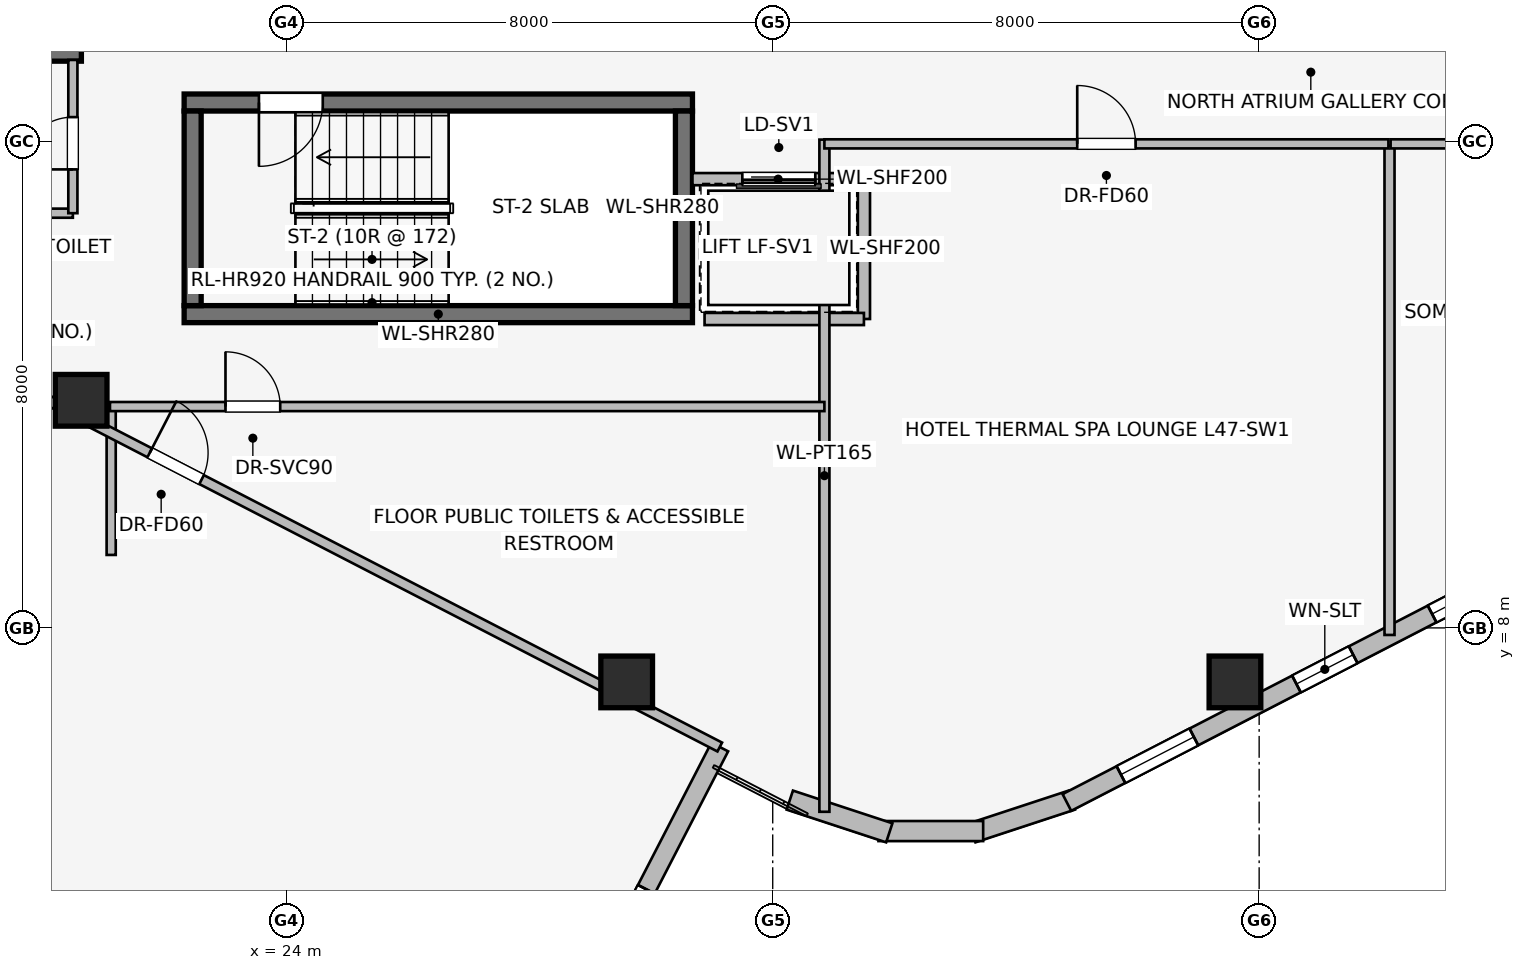
"""IFC4 building model, lengths in metres.
Left out: names, types, materials, properties, quantities, classifications, styles, units other than length and angle.
Written with IfcOpenShell. Run it as: python <this file> out.ifc"""

import sys

from ifc_helpers import new_model, si_unit, direction, frame, frame_2d, origin, origin_2d, place, context, subcontext, project, spatial, rectangle, extrude, element, fill, save


model = new_model("IFC4")
c1 = context("Model", 3, precision=1e-05, world=origin(), true_north=direction((0.0, 1.0)))
c2 = subcontext(c1, "Body", "Model", "MODEL_VIEW")
j1 = project(units=[si_unit("LENGTHUNIT", "METRE"), si_unit("PLANEANGLEUNIT", "RADIAN")], contexts=[c1])
p1 = place(None, origin())
s1 = spatial("IfcSite", under=j1, at=p1, CompositionType="ELEMENT")
p2 = place(p1, origin())
s2 = spatial("IfcBuilding", under=s1, at=p2, CompositionType="ELEMENT")
p3 = place(p2, frame((0.0, 0.0, 174.0)))
s3 = spatial("IfcBuildingStorey", under=s2, at=p3, CompositionType="ELEMENT", Elevation=174.0)
p4 = place(p3, frame((16.87, 17.46, 0.0), z_axis=(0.0, 0.0, 1.0), x_axis=(1.0, 0.0, 0.0)))
e1 = element("IfcWall", 1, at=p4, inside=s3, PredefinedType="SHEAR", context=c2, shape_type="SweptSolid", body=[
    extrude(rectangle(XDim=3.76, YDim=0.28, at=frame_2d((1.88, 0.0))), origin(), (0.0, 0.0, 1.0), 3.45),
])
p5 = place(p3, frame((22.32, 13.16, 0.0), z_axis=(0.0, 0.0, 1.0), x_axis=(1.0, 0.0, 0.0)))
e2 = element("IfcWall", 2, at=p5, inside=s3, PredefinedType="SHEAR", context=c2, shape_type="SweptSolid", body=[
    extrude(rectangle(XDim=8.36, YDim=0.28, at=frame_2d((4.18, 0.0))), origin(), (0.0, 0.0, 1.0), 3.45),
])
p6 = place(p3, frame((30.68, 16.64, 0.0), z_axis=(0.0, 0.0, 1.0), x_axis=(-1.0, 0.0, 0.0)))
e3 = element("IfcWall", 3, at=p6, inside=s3, PredefinedType="SHEAR", context=c2, shape_type="SweptSolid", body=[
    extrude(rectangle(XDim=8.36, YDim=0.28, at=frame_2d((4.18, 0.0))), origin(), (0.0, 0.0, 1.0), 3.45),
])
p7 = place(p6, frame((6.08, 0.0, 0.0)))
e4 = element("IfcOpeningElement", 4, at=p7, cuts=e3, PredefinedType="OPENING", context=c2, shape_type="SweptSolid", body=[
    extrude(rectangle(XDim=1.05, YDim=2.0, at=frame_2d((0.525, 1.0))), frame((0.0, 0.15, 0.0), z_axis=(0.0, -1.0, 0.0), x_axis=(1.0, 0.0, 0.0)), (0.0, 0.0, 1.0), 0.3),
])
for number, where, z_axis, x_axis in (
    (5, (22.46, 16.5, 0.0), (0.0, 0.0, 1.0), (0.0, -1.0, 0.0)),
    (6, (30.54, 13.3, 0.0), (0.0, 0.0, 1.0), (0.0, 1.0, 0.0)),
):
    element("IfcWall", number, at=place(p3, frame(where, z_axis=z_axis, x_axis=x_axis)), inside=s3, PredefinedType="SHEAR", context=c2, shape_type="SweptSolid", body=[
        extrude(rectangle(XDim=3.2, YDim=0.28, at=frame_2d((1.6, 0.0))), origin(), (0.0, 0.0, 1.0), 3.45),
    ])
for number, where, z_axis, x_axis in (
    (7, (20.626, 11.743, 0.0), (0.0, 0.0, 1.0), (1.0, 0.0, 0.0)),
    (8, (29.598, 7.112, 0.0), (0.0, 0.0, 1.0), (1.0, 0.0, 0.0)),
    (9, (39.602, 7.112, 0.0), (0.0, 0.0, 1.0), (1.0, 0.0, 0.0)),
):
    element("IfcColumn", number, at=place(p3, frame(where, z_axis=z_axis, x_axis=x_axis)), inside=s3, PredefinedType="COLUMN", context=c2, shape_type="SweptSolid", body=[
        extrude(rectangle(XDim=0.85, YDim=0.85, at=origin_2d()), origin(), (0.0, 0.0, 1.0), 3.45),
    ])
p8 = place(p3, frame((31.129, 6.041, 0.0), z_axis=(0.0, 0.0, 1.0), x_axis=(-0.458626737826, -0.88862900884, 0.0)))
e10 = element("IfcWall", 10, at=p8, inside=s3, PredefinedType="STANDARD", context=c2, shape_type="SweptSolid", body=[
    extrude(rectangle(XDim=19.6, YDim=0.31, at=frame_2d((9.8, 0.0))), origin(), (0.0, 0.0, 1.0), 3.16),
])
p9 = place(p8, frame((2.633, 0.0, 0.75)))
e11 = element("IfcOpeningElement", 11, at=p9, cuts=e10, PredefinedType="OPENING", context=c2, shape_type="SweptSolid", body=[
    extrude(rectangle(XDim=2.0, YDim=1.5, at=frame_2d((1.0, 0.75))), frame((0.0, 0.165, 0.0), z_axis=(0.0, -1.0, 0.0), x_axis=(1.0, 0.0, 0.0)), (0.0, 0.0, 1.0), 0.33),
])
p10 = place(p8, frame((8.8, 0.0, 0.75)))
e12 = element("IfcOpeningElement", 12, at=p10, cuts=e10, PredefinedType="OPENING", context=c2, shape_type="SweptSolid", body=[
    extrude(rectangle(XDim=2.0, YDim=1.5, at=frame_2d((1.0, 0.75))), frame((0.0, 0.165, 0.0), z_axis=(0.0, -1.0, 0.0), x_axis=(1.0, 0.0, 0.0)), (0.0, 0.0, 1.0), 0.33),
])
p11 = place(p8, frame((14.967, 0.0, 0.75)))
e13 = element("IfcOpeningElement", 13, at=p11, cuts=e10, PredefinedType="OPENING", context=c2, shape_type="SweptSolid", body=[
    extrude(rectangle(XDim=2.0, YDim=1.5, at=frame_2d((1.0, 0.75))), frame((0.0, 0.165, 0.0), z_axis=(0.0, -1.0, 0.0), x_axis=(1.0, 0.0, 0.0)), (0.0, 0.0, 1.0), 0.33),
])
p12 = place(p3, frame((36.919, 5.168, 0.0), z_axis=(0.0, 0.0, 1.0), x_axis=(-0.949937416267, -0.312440242569, 0.0)))
e14 = element("IfcWall", 14, at=p12, inside=s3, PredefinedType="STANDARD", context=c2, shape_type="SweptSolid", body=[
    extrude(rectangle(XDim=1.722, YDim=0.33, at=frame_2d((0.861, 0.0))), origin(), (0.0, 0.0, 1.0), 3.16),
])
p13 = place(p3, frame((35.461, 4.659, 0.0), z_axis=(0.0, 0.0, 1.0), x_axis=(-1.0, 0.0, 0.0)))
e15 = element("IfcWall", 15, at=p13, inside=s3, PredefinedType="STANDARD", context=c2, shape_type="SweptSolid", body=[
    extrude(rectangle(XDim=1.722, YDim=0.33, at=frame_2d((0.861, 0.0))), origin(), (0.0, 0.0, 1.0), 3.16),
])
p14 = place(p3, frame((33.917, 4.63, 0.0), z_axis=(0.0, 0.0, 1.0), x_axis=(-0.949937416267, 0.312440242569, 0.0)))
e16 = element("IfcWall", 16, at=p14, inside=s3, PredefinedType="STANDARD", context=c2, shape_type="SweptSolid", body=[
    extrude(rectangle(XDim=1.722, YDim=0.33, at=frame_2d((0.861, 0.0))), origin(), (0.0, 0.0, 1.0), 3.16),
])
p15 = place(p3, frame((51.792, 12.847, 0.0), z_axis=(0.0, 0.0, 1.0), x_axis=(-0.888626188278, -0.458632202867, 0.0)))
e17 = element("IfcWall", 17, at=p15, inside=s3, PredefinedType="STANDARD", context=c2, shape_type="SweptSolid", body=[
    extrude(rectangle(XDim=16.828, YDim=0.31, at=frame_2d((8.414, 0.0))), origin(), (0.0, 0.0, 1.0), 3.16),
])
p16 = place(p15, frame((0.675, 0.0, 0.75)))
e18 = element("IfcOpeningElement", 18, at=p16, cuts=e17, PredefinedType="OPENING", context=c2, shape_type="SweptSolid", body=[
    extrude(rectangle(XDim=2.0, YDim=1.5, at=frame_2d((1.0, 0.75))), frame((0.0, 0.165, 0.0), z_axis=(0.0, -1.0, 0.0), x_axis=(1.0, 0.0, 0.0)), (0.0, 0.0, 1.0), 0.33),
])
p17 = place(p15, frame((4.349, 0.0, 0.75)))
e19 = element("IfcOpeningElement", 19, at=p17, cuts=e17, PredefinedType="OPENING", context=c2, shape_type="SweptSolid", body=[
    extrude(rectangle(XDim=1.35, YDim=1.45, at=frame_2d((0.675, 0.725))), frame((0.0, 0.165, 0.0), z_axis=(0.0, -1.0, 0.0), x_axis=(1.0, 0.0, 0.0)), (0.0, 0.0, 1.0), 0.33),
])
p18 = place(p15, frame((6.534, 0.0, 0.75)))
e20 = element("IfcOpeningElement", 20, at=p18, cuts=e17, PredefinedType="OPENING", context=c2, shape_type="SweptSolid", body=[
    extrude(rectangle(XDim=1.35, YDim=1.45, at=frame_2d((0.675, 0.725))), frame((0.0, 0.165, 0.0), z_axis=(0.0, -1.0, 0.0), x_axis=(1.0, 0.0, 0.0)), (0.0, 0.0, 1.0), 0.33),
])
p19 = place(p15, frame((8.719, 0.0, 0.75)))
e21 = element("IfcOpeningElement", 21, at=p19, cuts=e17, PredefinedType="OPENING", context=c2, shape_type="SweptSolid", body=[
    extrude(rectangle(XDim=1.35, YDim=1.45, at=frame_2d((0.675, 0.725))), frame((0.0, 0.165, 0.0), z_axis=(0.0, -1.0, 0.0), x_axis=(1.0, 0.0, 0.0)), (0.0, 0.0, 1.0), 0.33),
])
p20 = place(p15, frame((11.53, 0.0, 0.75)))
e22 = element("IfcOpeningElement", 22, at=p20, cuts=e17, PredefinedType="OPENING", context=c2, shape_type="SweptSolid", body=[
    extrude(rectangle(XDim=1.05, YDim=1.4, at=frame_2d((0.525, 0.7))), frame((0.0, 0.165, 0.0), z_axis=(0.0, -1.0, 0.0), x_axis=(1.0, 0.0, 0.0)), (0.0, 0.0, 1.0), 0.33),
])
p21 = place(p15, frame((14.478, 0.0, 0.75)))
e23 = element("IfcOpeningElement", 23, at=p21, cuts=e17, PredefinedType="OPENING", context=c2, shape_type="SweptSolid", body=[
    extrude(rectangle(XDim=1.35, YDim=1.45, at=frame_2d((0.675, 0.725))), frame((0.0, 0.165, 0.0), z_axis=(0.0, -1.0, 0.0), x_axis=(1.0, 0.0, 0.0)), (0.0, 0.0, 1.0), 0.33),
])
p22 = place(p3, frame((33.5, 15.38, 0.0), z_axis=(0.0, 0.0, 1.0), x_axis=(-1.0, 0.0, 0.0)))
e24 = element("IfcWall", 24, at=p22, inside=s3, PredefinedType="PARTITIONING", context=c2, shape_type="SweptSolid", body=[
    extrude(rectangle(XDim=2.82, YDim=0.2, at=frame_2d((1.41, 0.0))), origin(), (0.0, 0.0, 1.0), 3.16),
])
p23 = place(p22, frame((0.8, 0.0, 0.0)))
e25 = element("IfcOpeningElement", 25, at=p23, cuts=e24, PredefinedType="OPENING", context=c2, shape_type="SweptSolid", body=[
    extrude(rectangle(XDim=1.2, YDim=2.2, at=frame_2d((0.6, 1.1))), frame((0.0, 0.11, 0.0), z_axis=(0.0, -1.0, 0.0), x_axis=(1.0, 0.0, 0.0)), (0.0, 0.0, 1.0), 0.22),
])
p24 = place(p3, frame((33.5, 13.08, 0.0), z_axis=(0.0, 0.0, 1.0), x_axis=(0.0, 1.0, 0.0)))
e26 = element("IfcWall", 26, at=p24, inside=s3, PredefinedType="PARTITIONING", context=c2, shape_type="SweptSolid", body=[
    extrude(rectangle(XDim=2.3, YDim=0.2, at=frame_2d((1.15, 0.0))), origin(), (0.0, 0.0, 1.0), 3.16),
])
p25 = place(p3, frame((30.879, 13.08, 0.0), z_axis=(0.0, 0.0, 1.0), x_axis=(1.0, 0.0, 0.0)))
e27 = element("IfcWall", 27, at=p25, inside=s3, PredefinedType="PARTITIONING", context=c2, shape_type="SweptSolid", body=[
    extrude(rectangle(XDim=2.621, YDim=0.2, at=frame_2d((1.311, 0.0))), origin(), (0.0, 0.0, 1.0), 3.16),
])
p26 = place(p3, frame((18.1, 14.82, 0.0), z_axis=(0.0, 0.0, 1.0), x_axis=(1.0, 0.0, 0.0)))
e28 = element("IfcWall", 28, at=p26, inside=s3, PredefinedType="PARTITIONING", context=c2, shape_type="SweptSolid", body=[
    extrude(rectangle(XDim=2.39, YDim=0.15, at=frame_2d((1.195, 0.0))), origin(), (0.0, 0.0, 1.0), 3.16),
])
p27 = place(p3, frame((20.49, 14.82, 0.0), z_axis=(0.0, 0.0, 1.0), x_axis=(0.0, 1.0, 0.0)))
e29 = element("IfcWall", 29, at=p27, inside=s3, PredefinedType="PARTITIONING", context=c2, shape_type="SweptSolid", body=[
    extrude(rectangle(XDim=2.52, YDim=0.15, at=frame_2d((1.26, 0.0))), origin(), (0.0, 0.0, 1.0), 3.16),
])
p28 = place(p27, frame((0.72, 0.0, 0.0)))
e30 = element("IfcOpeningElement", 30, at=p28, cuts=e29, PredefinedType="OPENING", context=c2, shape_type="SweptSolid", body=[
    extrude(rectangle(XDim=0.86, YDim=2.0, at=frame_2d((0.43, 1.0))), frame((0.0, 0.085, 0.0), z_axis=(0.0, -1.0, 0.0), x_axis=(1.0, 0.0, 0.0)), (0.0, 0.0, 1.0), 0.17),
])
p29 = place(p3, frame((21.12, 9.2, 0.0), z_axis=(0.0, 0.0, 1.0), x_axis=(0.0, 1.0, 0.0)))
e31 = element("IfcWall", 31, at=p29, inside=s3, PredefinedType="PARTITIONING", context=c2, shape_type="SweptSolid", body=[
    extrude(rectangle(XDim=2.48, YDim=0.15, at=frame_2d((1.24, 0.0))), origin(), (0.0, 0.0, 1.0), 3.16),
])
p30 = place(p3, frame((32.85, 4.976, 0.0), z_axis=(0.0, 0.0, 1.0), x_axis=(0.0, 1.0, 0.0)))
e32 = element("IfcWall", 32, at=p30, inside=s3, PredefinedType="PARTITIONING", context=c2, shape_type="SweptSolid", body=[
    extrude(rectangle(XDim=11.054, YDim=0.165, at=frame_2d((5.527, 0.0))), origin(), (0.0, 0.0, 1.0), 3.16),
])
p31 = place(p3, frame((21.1, 11.64, 0.0), z_axis=(0.0, 0.0, 1.0), x_axis=(1.0, 0.0, 0.0)))
e33 = element("IfcWall", 33, at=p31, inside=s3, PredefinedType="PARTITIONING", context=c2, shape_type="SweptSolid", body=[
    extrude(rectangle(XDim=11.75, YDim=0.15, at=frame_2d((5.875, 0.0))), origin(), (0.0, 0.0, 1.0), 3.16),
])
p32 = place(p31, frame((1.9, 0.0, 0.0)))
e34 = element("IfcOpeningElement", 34, at=p32, cuts=e33, PredefinedType="OPENING", context=c2, shape_type="SweptSolid", body=[
    extrude(rectangle(XDim=0.9, YDim=2.0, at=frame_2d((0.45, 1.0))), frame((0.0, 0.085, 0.0), z_axis=(0.0, -1.0, 0.0), x_axis=(1.0, 0.0, 0.0)), (0.0, 0.0, 1.0), 0.17),
])
p33 = place(p3, frame((42.144, 7.884, 0.0), z_axis=(0.0, 0.0, 1.0), x_axis=(0.0, 1.0, 0.0)))
e35 = element("IfcWall", 35, at=p33, inside=s3, PredefinedType="PARTITIONING", context=c2, shape_type="SweptSolid", body=[
    extrude(rectangle(XDim=8.046, YDim=0.165, at=frame_2d((4.023, 0.0))), origin(), (0.0, 0.0, 1.0), 3.16),
])
p34 = place(p3, frame((32.85, 15.96, 0.0), z_axis=(0.0, 0.0, 1.0), x_axis=(1.0, 0.0, 0.0)))
e36 = element("IfcWall", 36, at=p34, inside=s3, PredefinedType="PARTITIONING", context=c2, shape_type="SweptSolid", body=[
    extrude(rectangle(XDim=9.276, YDim=0.15, at=frame_2d((4.638, 0.0))), origin(), (0.0, 0.0, 1.0), 3.16),
])
p35 = place(p34, frame((4.158, 0.0, 0.0)))
e37 = element("IfcOpeningElement", 37, at=p35, cuts=e36, PredefinedType="OPENING", context=c2, shape_type="SweptSolid", body=[
    extrude(rectangle(XDim=0.96, YDim=2.0, at=frame_2d((0.48, 1.0))), frame((0.0, 0.085, 0.0), z_axis=(0.0, -1.0, 0.0), x_axis=(1.0, 0.0, 0.0)), (0.0, 0.0, 1.0), 0.17),
])
p36 = place(p3, frame((42.162, 15.96, 0.0), z_axis=(0.0, 0.0, 1.0), x_axis=(1.0, 0.0, 0.0)))
e38 = element("IfcWall", 38, at=p36, inside=s3, PredefinedType="PARTITIONING", context=c2, shape_type="SweptSolid", body=[
    extrude(rectangle(XDim=11.901, YDim=0.15, at=frame_2d((5.95, 0.0))), origin(), (0.0, 0.0, 1.0), 3.16),
])
p37 = place(p36, frame((5.539, 0.0, 0.0)))
e39 = element("IfcOpeningElement", 39, at=p37, cuts=e38, PredefinedType="OPENING", context=c2, shape_type="SweptSolid", body=[
    extrude(rectangle(XDim=0.96, YDim=2.0, at=frame_2d((0.48, 1.0))), frame((0.0, 0.085, 0.0), z_axis=(0.0, -1.0, 0.0), x_axis=(1.0, 0.0, 0.0)), (0.0, 0.0, 1.0), 0.17),
])
p38 = place(p3, frame((18.866, 12.37, 0.0), z_axis=(0.0, 0.0, 1.0), x_axis=(0.888625308836, -0.458633906832, 0.0)))
e40 = element("IfcWall", 40, at=p38, inside=s3, PredefinedType="PARTITIONING", context=c2, shape_type="SweptSolid", body=[
    extrude(rectangle(XDim=13.8, YDim=0.165, at=frame_2d((6.9, 0.0))), origin(), (0.0, 0.0, 1.0), 2.611),
])
p39 = place(p38, frame((3.25, 0.0, 0.0)))
e41 = element("IfcOpeningElement", 41, at=p39, cuts=e40, PredefinedType="OPENING", context=c2, shape_type="SweptSolid", body=[
    extrude(rectangle(XDim=0.96, YDim=2.0, at=frame_2d((0.48, 1.0))), frame((0.0, 0.093, 0.0), z_axis=(0.0, -1.0, 0.0), x_axis=(1.0, 0.0, 0.0)), (0.0, 0.0, 1.0), 0.185),
])
p40 = place(p9, origin())
e42 = element("IfcWindow", 42, at=p40, inside=s3, PartitioningType="SINGLE_PANEL", PredefinedType="WINDOW", context=c2, shape_type="SweptSolid", body=[
    extrude(rectangle(XDim=2.0, YDim=1.5, at=frame_2d((1.0, 0.75))), frame((0.0, 0.03, 0.0), z_axis=(0.0, -1.0, 0.0), x_axis=(1.0, 0.0, 0.0)), (0.0, 0.0, 1.0), 0.06),
])
fill(e11, e42)
p41 = place(p19, origin())
e43 = element("IfcWindow", 43, at=p41, inside=s3, PartitioningType="SINGLE_PANEL", PredefinedType="WINDOW", context=c2, shape_type="SweptSolid", body=[
    extrude(rectangle(XDim=1.35, YDim=1.45, at=frame_2d((0.675, 0.725))), frame((0.0, 0.03, 0.0), z_axis=(0.0, -1.0, 0.0), x_axis=(1.0, 0.0, 0.0)), (0.0, 0.0, 1.0), 0.06),
])
fill(e21, e43)
p42 = place(p20, origin())
e44 = element("IfcWindow", 44, at=p42, inside=s3, PartitioningType="SINGLE_PANEL", PredefinedType="WINDOW", context=c2, shape_type="SweptSolid", body=[
    extrude(rectangle(XDim=1.05, YDim=1.4, at=frame_2d((0.525, 0.7))), frame((0.0, 0.03, 0.0), z_axis=(0.0, -1.0, 0.0), x_axis=(1.0, 0.0, 0.0)), (0.0, 0.0, 1.0), 0.06),
])
fill(e22, e44)
p43 = place(p21, origin())
e45 = element("IfcWindow", 45, at=p43, inside=s3, PartitioningType="SINGLE_PANEL", PredefinedType="WINDOW", context=c2, shape_type="SweptSolid", body=[
    extrude(rectangle(XDim=1.35, YDim=1.45, at=frame_2d((0.675, 0.725))), frame((0.0, 0.03, 0.0), z_axis=(0.0, -1.0, 0.0), x_axis=(1.0, 0.0, 0.0)), (0.0, 0.0, 1.0), 0.06),
])
fill(e23, e45)
p44 = place(p7, origin())
e46 = element("IfcDoor", 46, at=p44, inside=s3, OperationType="SINGLE_SWING_RIGHT", PredefinedType="DOOR", context=c2, shape_type="SweptSolid", body=[
    extrude(rectangle(XDim=1.05, YDim=2.0, at=frame_2d((0.525, 1.0))), frame((0.0, 0.025, 0.0), z_axis=(0.0, -1.0, 0.0), x_axis=(1.0, 0.0, 0.0)), (0.0, 0.0, 1.0), 0.05),
])
fill(e4, e46)
p45 = place(p23, origin())
e47 = element("IfcDoor", 47, at=p45, inside=s3, OperationType="SLIDING_TO_RIGHT", PredefinedType="DOOR", context=c2, shape_type="SweptSolid", body=[
    extrude(rectangle(XDim=1.2, YDim=2.2, at=frame_2d((0.6, 1.1))), frame((0.0, 0.025, 0.0), z_axis=(0.0, -1.0, 0.0), x_axis=(1.0, 0.0, 0.0)), (0.0, 0.0, 1.0), 0.05),
])
fill(e25, e47)
p46 = place(p28, origin())
e48 = element("IfcDoor", 48, at=p46, inside=s3, OperationType="SINGLE_SWING_LEFT", PredefinedType="DOOR", context=c2, shape_type="SweptSolid", body=[
    extrude(rectangle(XDim=0.86, YDim=2.0, at=frame_2d((0.43, 1.0))), frame((0.0, 0.025, 0.0), z_axis=(0.0, -1.0, 0.0), x_axis=(1.0, 0.0, 0.0)), (0.0, 0.0, 1.0), 0.05),
])
fill(e30, e48)
p47 = place(p32, origin())
e49 = element("IfcDoor", 49, at=p47, inside=s3, OperationType="SINGLE_SWING_LEFT", PredefinedType="DOOR", context=c2, shape_type="SweptSolid", body=[
    extrude(rectangle(XDim=0.9, YDim=2.0, at=frame_2d((0.45, 1.0))), frame((0.0, 0.025, 0.0), z_axis=(0.0, -1.0, 0.0), x_axis=(1.0, 0.0, 0.0)), (0.0, 0.0, 1.0), 0.05),
])
fill(e34, e49)
p48 = place(p35, origin())
e50 = element("IfcDoor", 50, at=p48, inside=s3, OperationType="SINGLE_SWING_LEFT", PredefinedType="DOOR", context=c2, shape_type="SweptSolid", body=[
    extrude(rectangle(XDim=0.96, YDim=2.0, at=frame_2d((0.48, 1.0))), frame((0.0, 0.025, 0.0), z_axis=(0.0, -1.0, 0.0), x_axis=(1.0, 0.0, 0.0)), (0.0, 0.0, 1.0), 0.05),
])
fill(e37, e50)
p49 = place(p39, origin())
e51 = element("IfcDoor", 51, at=p49, inside=s3, OperationType="SINGLE_SWING_LEFT", PredefinedType="DOOR", context=c2, shape_type="SweptSolid", body=[
    extrude(rectangle(XDim=0.96, YDim=2.0, at=frame_2d((0.48, 1.0))), frame((0.0, 0.025, 0.0), z_axis=(0.0, -1.0, 0.0), x_axis=(1.0, 0.0, 0.0)), (0.0, 0.0, 1.0), 0.05),
])
fill(e41, e51)
save(model, sys.argv[1])
